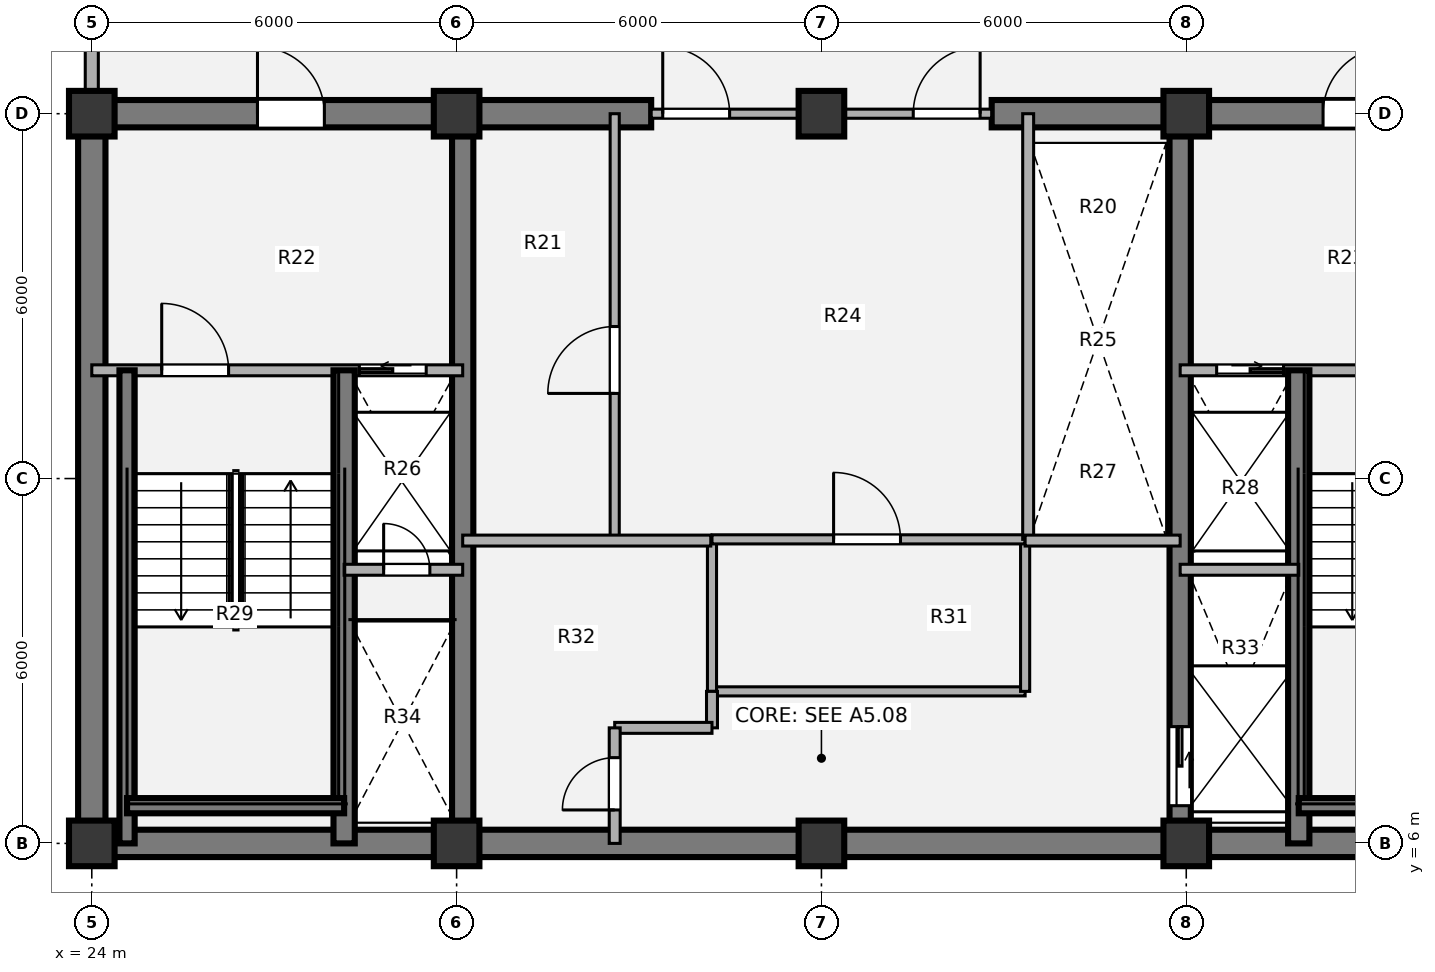
"""IFC4 building model, lengths in metres.
Left out: names, types, materials, properties, quantities, classifications, styles, units other than length and angle.
Written with IfcOpenShell. Run it as: python <this file> out.ifc"""

import sys

from ifc_helpers import new_model, si_unit, direction, frame, frame_2d, origin, origin_2d, place, context, subcontext, project, spatial, rectangle, extrude, source, transform, mapped, element, fill, save


model = new_model("IFC4")
c1 = context("Model", 3, precision=1e-05, world=origin(), true_north=direction((0.0, 1.0)))
c2 = subcontext(c1, "Body", "Model", "MODEL_VIEW")
j1 = project(units=[si_unit("LENGTHUNIT", "METRE"), si_unit("PLANEANGLEUNIT", "RADIAN")], contexts=[c1])
p1 = place(None, origin())
s1 = spatial("IfcSite", under=j1, at=p1, CompositionType="ELEMENT")
p2 = place(p1, origin())
s2 = spatial("IfcBuilding", under=s1, at=p2, CompositionType="ELEMENT")
p3 = place(p2, frame((0.0, 0.0, 175.32)))
s3 = spatial("IfcBuildingStorey", under=s2, at=p3, CompositionType="ELEMENT", Elevation=175.32)
m1 = source(origin(), c2, "Body", "SweptSolid", [
    extrude(rectangle(XDim=0.75, YDim=0.75, at=origin_2d()), origin(), (0.0, 0.0, 1.0), 3.78),
])
for number, where, z_axis, x_axis in (
    (1, (24.0, 6.0, 0.0), (0.0, 0.0, 1.0), (1.0, 0.0, 0.0)),
    (2, (30.0, 6.0, 0.0), (0.0, 0.0, 1.0), (1.0, 0.0, 0.0)),
    (3, (36.0, 6.0, 0.0), (0.0, 0.0, 1.0), (1.0, 0.0, 0.0)),
    (4, (42.0, 6.0, 0.0), (0.0, 0.0, 1.0), (1.0, 0.0, 0.0)),
    (5, (24.0, 18.0, 0.0), (0.0, 0.0, 1.0), (1.0, 0.0, 0.0)),
    (6, (30.0, 18.0, 0.0), (0.0, 0.0, 1.0), (1.0, 0.0, 0.0)),
    (7, (36.0, 18.0, 0.0), (0.0, 0.0, 1.0), (1.0, 0.0, 0.0)),
    (8, (42.0, 18.0, 0.0), (0.0, 0.0, 1.0), (1.0, 0.0, 0.0)),
):
    element("IfcColumn", number, at=place(p3, frame(where, z_axis=z_axis, x_axis=x_axis)), inside=s3, PredefinedType="COLUMN", context=c2, shape_type="MappedRepresentation", body=[
        mapped(m1, transform((0.0, 0.0, 0.0), x_axis=(1.0, 0.0, 0.0), y_axis=(0.0, 1.0, 0.0), z_axis=(0.0, 0.0, 1.0), scale=1.0)),
    ])
p4 = place(p3, frame((48.225, 6.0, 0.0), z_axis=(0.0, 0.0, 1.0), x_axis=(-1.0, 0.0, 0.0)))
e9 = element("IfcWall", 9, at=p4, inside=s3, PredefinedType="SHEAR", context=c2, shape_type="SweptSolid", body=[
    extrude(rectangle(XDim=24.45, YDim=0.45, at=frame_2d((12.225, 0.0))), origin(), (0.0, 0.0, 1.0), 3.78),
])
p5 = place(p3, frame((24.0, 6.0, 0.0), z_axis=(0.0, 0.0, 1.0), x_axis=(0.0, 1.0, 0.0)))
e10 = element("IfcWall", 10, at=p5, inside=s3, PredefinedType="SHEAR", context=c2, shape_type="SweptSolid", body=[
    extrude(rectangle(XDim=12.0, YDim=0.45, at=frame_2d((6.0, 0.0))), origin(), (0.0, 0.0, 1.0), 3.78),
])
p6 = place(p3, frame((23.775, 18.0, 0.0), z_axis=(0.0, 0.0, 1.0), x_axis=(1.0, 0.0, 0.0)))
e11 = element("IfcWall", 11, at=p6, inside=s3, PredefinedType="SHEAR", context=c2, shape_type="SweptSolid", body=[
    extrude(rectangle(XDim=9.425, YDim=0.45, at=frame_2d((4.712, 0.0))), origin(), (0.0, 0.0, 1.0), 3.78),
])
p7 = place(p6, frame((2.95, 0.0, 0.0)))
e12 = element("IfcOpeningElement", 12, at=p7, cuts=e11, PredefinedType="OPENING", context=c2, shape_type="SweptSolid", body=[
    extrude(rectangle(XDim=1.1, YDim=2.1, at=origin_2d()), frame((0.55, 0.235, 1.05), z_axis=(0.0, -1.0, 0.0), x_axis=(1.0, 0.0, 0.0)), (0.0, 0.0, 1.0), 0.47),
])
p8 = place(p3, frame((38.8, 18.0, 0.0), z_axis=(0.0, 0.0, 1.0), x_axis=(1.0, 0.0, 0.0)))
e13 = element("IfcWall", 13, at=p8, inside=s3, PredefinedType="SHEAR", context=c2, shape_type="SweptSolid", body=[
    extrude(rectangle(XDim=9.425, YDim=0.45, at=frame_2d((4.712, 0.0))), origin(), (0.0, 0.0, 1.0), 3.78),
])
p9 = place(p8, frame((5.45, 0.0, 0.0)))
e14 = element("IfcOpeningElement", 14, at=p9, cuts=e13, PredefinedType="OPENING", context=c2, shape_type="SweptSolid", body=[
    extrude(rectangle(XDim=1.1, YDim=2.1, at=origin_2d()), frame((0.55, 0.235, 1.05), z_axis=(0.0, -1.0, 0.0), x_axis=(1.0, 0.0, 0.0)), (0.0, 0.0, 1.0), 0.47),
])
p10 = place(p3, frame((30.1, 6.0, 0.0), z_axis=(0.0, 0.0, 1.0), x_axis=(0.0, 1.0, 0.0)))
e15 = element("IfcWall", 15, at=p10, inside=s3, PredefinedType="SHEAR", context=c2, shape_type="SweptSolid", body=[
    extrude(rectangle(XDim=12.0, YDim=0.35, at=frame_2d((6.0, 0.0))), origin(), (0.0, 0.0, 1.0), 3.78),
])
p11 = place(p3, frame((41.9, 18.0, 0.0), z_axis=(0.0, 0.0, 1.0), x_axis=(0.0, -1.0, 0.0)))
e16 = element("IfcWall", 16, at=p11, inside=s3, PredefinedType="SHEAR", context=c2, shape_type="SweptSolid", body=[
    extrude(rectangle(XDim=12.0, YDim=0.35, at=frame_2d((6.0, 0.0))), origin(), (0.0, 0.0, 1.0), 3.78),
])
p12 = place(p11, frame((10.08, 0.0, 0.0)))
e17 = element("IfcOpeningElement", 17, at=p12, cuts=e16, PredefinedType="OPENING", context=c2, shape_type="SweptSolid", body=[
    extrude(rectangle(XDim=1.3, YDim=2.1, at=origin_2d()), frame((0.65, 0.185, 1.05), z_axis=(0.0, -1.0, 0.0), x_axis=(1.0, 0.0, 0.0)), (0.0, 0.0, 1.0), 0.37),
])
p13 = place(p3, frame((24.0, 18.355, 0.0), z_axis=(0.0, 0.0, 1.0), x_axis=(0.0, 1.0, 0.0)))
e18 = element("IfcWall", 18, at=p13, inside=s3, PredefinedType="SOLIDWALL", context=c2, shape_type="SweptSolid", body=[
    extrude(rectangle(XDim=2.695, YDim=0.215, at=frame_2d((1.348, 0.0))), origin(), (0.0, 0.0, 1.0), 2.718),
])
p14 = place(p3, frame((32.6, 11.0, 0.0), z_axis=(0.0, 0.0, 1.0), x_axis=(0.0, 1.0, 0.0)))
e19 = element("IfcWall", 19, at=p14, inside=s3, PredefinedType="PARTITIONING", context=c2, shape_type="SweptSolid", body=[
    extrude(rectangle(XDim=7.0, YDim=0.15, at=frame_2d((3.5, 0.0))), origin(), (0.0, 0.0, 1.0), 3.5),
])
p15 = place(p14, frame((2.4, 0.0, 0.0)))
e20 = element("IfcOpeningElement", 20, at=p15, cuts=e19, PredefinedType="OPENING", context=c2, shape_type="SweptSolid", body=[
    extrude(rectangle(XDim=1.1, YDim=2.1, at=origin_2d()), frame((0.55, 0.085, 1.05), z_axis=(0.0, -1.0, 0.0), x_axis=(1.0, 0.0, 0.0)), (0.0, 0.0, 1.0), 0.17),
])
p16 = place(p3, frame((34.2, 8.5, 0.0), z_axis=(0.0, 0.0, 1.0), x_axis=(1.0, 0.0, 0.0)))
e21 = element("IfcWall", 21, at=p16, inside=s3, PredefinedType="PARTITIONING", context=c2, shape_type="SweptSolid", body=[
    extrude(rectangle(XDim=5.15, YDim=0.15, at=frame_2d((2.575, 0.0))), origin(), (0.0, 0.0, 1.0), 3.5),
])
for number, where, z_axis, x_axis in (
    (22, (34.2, 8.5, 0.0), (0.0, 0.0, 1.0), (0.0, 1.0, 0.0)),
    (23, (39.35, 8.5, 0.0), (0.0, 0.0, 1.0), (0.0, 1.0, 0.0)),
):
    element("IfcWall", number, at=place(p3, frame(where, z_axis=z_axis, x_axis=x_axis)), inside=s3, PredefinedType="PARTITIONING", context=c2, shape_type="SweptSolid", body=[
        extrude(rectangle(XDim=2.5, YDim=0.15, at=frame_2d((1.25, 0.0))), origin(), (0.0, 0.0, 1.0), 3.5),
    ])
p17 = place(p3, frame((34.2, 11.0, 0.0), z_axis=(0.0, 0.0, 1.0), x_axis=(1.0, 0.0, 0.0)))
e24 = element("IfcWall", 24, at=p17, inside=s3, PredefinedType="PARTITIONING", context=c2, shape_type="SweptSolid", body=[
    extrude(rectangle(XDim=5.15, YDim=0.15, at=frame_2d((2.575, 0.0))), origin(), (0.0, 0.0, 1.0), 3.5),
])
p18 = place(p17, frame((2.0, 0.0, 0.0)))
e25 = element("IfcOpeningElement", 25, at=p18, cuts=e24, PredefinedType="OPENING", context=c2, shape_type="SweptSolid", body=[
    extrude(rectangle(XDim=1.1, YDim=2.1, at=origin_2d()), frame((0.55, 0.085, 1.05), z_axis=(0.0, -1.0, 0.0), x_axis=(1.0, 0.0, 0.0)), (0.0, 0.0, 1.0), 0.17),
])
p19 = place(p3, frame((39.4, 11.0, 0.0), z_axis=(0.0, 0.0, 1.0), x_axis=(0.0, 1.0, 0.0)))
e26 = element("IfcWall", 26, at=p19, inside=s3, PredefinedType="PARTITIONING", context=c2, shape_type="SweptSolid", body=[
    extrude(rectangle(XDim=7.0, YDim=0.18, at=frame_2d((3.5, 0.0))), origin(), (0.0, 0.0, 1.0), 3.5),
])
p20 = place(p3, frame((30.1, 10.98, 0.0), z_axis=(0.0, 0.0, 1.0), x_axis=(1.0, 0.0, 0.0)))
e27 = element("IfcWall", 27, at=p20, inside=s3, PredefinedType="PARTITIONING", context=c2, shape_type="SweptSolid", body=[
    extrude(rectangle(XDim=4.08, YDim=0.18, at=frame_2d((2.04, 0.0))), origin(), (0.0, 0.0, 1.0), 3.5),
])
p21 = place(p3, frame((34.2, 7.9, 0.0), z_axis=(0.0, 0.0, 1.0), x_axis=(0.0, 1.0, 0.0)))
e28 = element("IfcWall", 28, at=p21, inside=s3, PredefinedType="PARTITIONING", context=c2, shape_type="SweptSolid", body=[
    extrude(rectangle(XDim=0.6, YDim=0.18, at=frame_2d((0.3, 0.0))), origin(), (0.0, 0.0, 1.0), 3.5),
])
p22 = place(p3, frame((32.6, 7.9, 0.0), z_axis=(0.0, 0.0, 1.0), x_axis=(1.0, 0.0, 0.0)))
e29 = element("IfcWall", 29, at=p22, inside=s3, PredefinedType="PARTITIONING", context=c2, shape_type="SweptSolid", body=[
    extrude(rectangle(XDim=1.6, YDim=0.18, at=frame_2d((0.8, 0.0))), origin(), (0.0, 0.0, 1.0), 3.5),
])
p23 = place(p3, frame((32.6, 6.0, 0.0), z_axis=(0.0, 0.0, 1.0), x_axis=(0.0, 1.0, 0.0)))
e30 = element("IfcWall", 30, at=p23, inside=s3, PredefinedType="PARTITIONING", context=c2, shape_type="SweptSolid", body=[
    extrude(rectangle(XDim=1.9, YDim=0.18, at=frame_2d((0.95, 0.0))), origin(), (0.0, 0.0, 1.0), 3.5),
])
p24 = place(p23, frame((0.55, 0.0, 0.0)))
e31 = element("IfcOpeningElement", 31, at=p24, cuts=e30, PredefinedType="OPENING", context=c2, shape_type="SweptSolid", body=[
    extrude(rectangle(XDim=0.86, YDim=2.1, at=origin_2d()), frame((0.43, 0.1, 1.05), z_axis=(0.0, -1.0, 0.0), x_axis=(1.0, 0.0, 0.0)), (0.0, 0.0, 1.0), 0.2),
])
p25 = place(p3, frame((39.35, 10.98, 0.0), z_axis=(0.0, 0.0, 1.0), x_axis=(1.0, 0.0, 0.0)))
e32 = element("IfcWall", 32, at=p25, inside=s3, PredefinedType="PARTITIONING", context=c2, shape_type="SweptSolid", body=[
    extrude(rectangle(XDim=2.55, YDim=0.18, at=frame_2d((1.275, 0.0))), origin(), (0.0, 0.0, 1.0), 3.5),
])
p26 = place(p3, frame((33.2, 18.0, 0.0), z_axis=(0.0, 0.0, 1.0), x_axis=(1.0, 0.0, 0.0)))
e33 = element("IfcWall", 33, at=p26, inside=s3, PredefinedType="PARTITIONING", context=c2, shape_type="SweptSolid", body=[
    extrude(rectangle(XDim=5.6, YDim=0.15, at=frame_2d((2.8, 0.0))), origin(), (0.0, 0.0, 1.0), 2.515),
])
p27 = place(p26, frame((0.19, 0.0, 0.0)))
e34 = element("IfcOpeningElement", 34, at=p27, cuts=e33, PredefinedType="OPENING", context=c2, shape_type="SweptSolid", body=[
    extrude(rectangle(XDim=1.1, YDim=2.1, at=origin_2d()), frame((0.55, 0.085, 1.05), z_axis=(0.0, -1.0, 0.0), x_axis=(1.0, 0.0, 0.0)), (0.0, 0.0, 1.0), 0.17),
])
p28 = place(p26, frame((4.31, 0.0, 0.0)))
e35 = element("IfcOpeningElement", 35, at=p28, cuts=e33, PredefinedType="OPENING", context=c2, shape_type="SweptSolid", body=[
    extrude(rectangle(XDim=1.1, YDim=2.1, at=origin_2d()), frame((0.55, 0.085, 1.05), z_axis=(0.0, -1.0, 0.0), x_axis=(1.0, 0.0, 0.0)), (0.0, 0.0, 1.0), 0.17),
])
p29 = place(p3, frame((24.0, 13.78, 0.0), z_axis=(0.0, 0.0, 1.0), x_axis=(1.0, 0.0, 0.0)))
e36 = element("IfcWall", 36, at=p29, inside=s3, PredefinedType="PARTITIONING", context=c2, shape_type="SweptSolid", body=[
    extrude(rectangle(XDim=6.1, YDim=0.18, at=frame_2d((3.05, 0.0))), origin(), (0.0, 0.0, 1.0), 3.5),
])
p30 = place(p29, frame((1.15, 0.0, 0.0)))
e37 = element("IfcOpeningElement", 37, at=p30, cuts=e36, PredefinedType="OPENING", context=c2, shape_type="SweptSolid", body=[
    extrude(rectangle(XDim=1.1, YDim=2.1, at=origin_2d()), frame((0.55, 0.1, 1.05), z_axis=(0.0, -1.0, 0.0), x_axis=(1.0, 0.0, 0.0)), (0.0, 0.0, 1.0), 0.2),
])
p31 = place(p29, frame((4.4, 0.0, 0.0)))
e38 = element("IfcOpeningElement", 38, at=p31, cuts=e36, PredefinedType="OPENING", context=c2, shape_type="SweptSolid", body=[
    extrude(rectangle(XDim=1.1, YDim=2.1, at=origin_2d()), frame((0.55, 0.1, 1.05), z_axis=(0.0, -1.0, 0.0), x_axis=(1.0, 0.0, 0.0)), (0.0, 0.0, 1.0), 0.2),
])
p32 = place(p3, frame((28.15, 6.0, 0.0), z_axis=(0.0, 0.0, 1.0), x_axis=(0.0, 1.0, 0.0)))
e39 = element("IfcWall", 39, at=p32, inside=s3, PredefinedType="SHEAR", context=c2, shape_type="SweptSolid", body=[
    extrude(rectangle(XDim=7.78, YDim=0.35, at=frame_2d((3.89, 0.0))), origin(), (0.0, 0.0, 1.0), 3.85),
])
p33 = place(p3, frame((24.58, 6.0, 0.0), z_axis=(0.0, 0.0, 1.0), x_axis=(0.0, 1.0, 0.0)))
e40 = element("IfcWall", 40, at=p33, inside=s3, PredefinedType="SHEAR", context=c2, shape_type="SweptSolid", body=[
    extrude(rectangle(XDim=7.78, YDim=0.25, at=frame_2d((3.89, 0.0))), origin(), (0.0, 0.0, 1.0), 3.85),
])
p34 = place(p3, frame((24.58, 6.62, 0.0), z_axis=(0.0, 0.0, 1.0), x_axis=(1.0, 0.0, 0.0)))
e41 = element("IfcWall", 41, at=p34, inside=s3, PredefinedType="SHEAR", context=c2, shape_type="SweptSolid", body=[
    extrude(rectangle(XDim=3.57, YDim=0.25, at=frame_2d((1.785, 0.0))), origin(), (0.0, 0.0, 1.0), 3.85),
])
p35 = place(p3, frame((28.15, 10.5, 0.0), z_axis=(0.0, 0.0, 1.0), x_axis=(1.0, 0.0, 0.0)))
e42 = element("IfcWall", 42, at=p35, inside=s3, PredefinedType="PARTITIONING", context=c2, shape_type="SweptSolid", body=[
    extrude(rectangle(XDim=1.95, YDim=0.18, at=frame_2d((0.975, 0.0))), origin(), (0.0, 0.0, 1.0), 3.5),
])
p36 = place(p35, frame((0.65, 0.0, 0.0)))
e43 = element("IfcOpeningElement", 43, at=p36, cuts=e42, PredefinedType="OPENING", context=c2, shape_type="SweptSolid", body=[
    extrude(rectangle(XDim=0.76, YDim=2.05, at=origin_2d()), frame((0.38, 0.1, 1.025), z_axis=(0.0, -1.0, 0.0), x_axis=(1.0, 0.0, 0.0)), (0.0, 0.0, 1.0), 0.2),
])
p37 = place(p3, frame((41.9, 13.78, 0.0), z_axis=(0.0, 0.0, 1.0), x_axis=(1.0, 0.0, 0.0)))
e44 = element("IfcWall", 44, at=p37, inside=s3, PredefinedType="PARTITIONING", context=c2, shape_type="SweptSolid", body=[
    extrude(rectangle(XDim=6.1, YDim=0.18, at=frame_2d((3.05, 0.0))), origin(), (0.0, 0.0, 1.0), 3.5),
])
p38 = place(p37, frame((0.6, 0.0, 0.0)))
e45 = element("IfcOpeningElement", 45, at=p38, cuts=e44, PredefinedType="OPENING", context=c2, shape_type="SweptSolid", body=[
    extrude(rectangle(XDim=1.1, YDim=2.1, at=origin_2d()), frame((0.55, 0.1, 1.05), z_axis=(0.0, -1.0, 0.0), x_axis=(1.0, 0.0, 0.0)), (0.0, 0.0, 1.0), 0.2),
])
p39 = place(p37, frame((3.8, 0.0, 0.0)))
e46 = element("IfcOpeningElement", 46, at=p39, cuts=e44, PredefinedType="OPENING", context=c2, shape_type="SweptSolid", body=[
    extrude(rectangle(XDim=1.1, YDim=2.1, at=origin_2d()), frame((0.55, 0.1, 1.05), z_axis=(0.0, -1.0, 0.0), x_axis=(1.0, 0.0, 0.0)), (0.0, 0.0, 1.0), 0.2),
])
p40 = place(p3, frame((43.85, 6.0, 0.0), z_axis=(0.0, 0.0, 1.0), x_axis=(0.0, 1.0, 0.0)))
e47 = element("IfcWall", 47, at=p40, inside=s3, PredefinedType="SHEAR", context=c2, shape_type="SweptSolid", body=[
    extrude(rectangle(XDim=7.78, YDim=0.35, at=frame_2d((3.89, 0.0))), origin(), (0.0, 0.0, 1.0), 3.85),
])
p41 = place(p3, frame((43.85, 6.62, 0.0), z_axis=(0.0, 0.0, 1.0), x_axis=(1.0, 0.0, 0.0)))
e48 = element("IfcWall", 48, at=p41, inside=s3, PredefinedType="SHEAR", context=c2, shape_type="SweptSolid", body=[
    extrude(rectangle(XDim=3.57, YDim=0.25, at=frame_2d((1.785, 0.0))), origin(), (0.0, 0.0, 1.0), 3.85),
])
p42 = place(p3, frame((41.9, 10.5, 0.0), z_axis=(0.0, 0.0, 1.0), x_axis=(1.0, 0.0, 0.0)))
e49 = element("IfcWall", 49, at=p42, inside=s3, PredefinedType="PARTITIONING", context=c2, shape_type="SweptSolid", body=[
    extrude(rectangle(XDim=1.95, YDim=0.18, at=frame_2d((0.975, 0.0))), origin(), (0.0, 0.0, 1.0), 3.5),
])
m2 = source(origin(), c2, "Body", "SweptSolid", [
    extrude(rectangle(XDim=1.1, YDim=2.1, at=origin_2d()), frame((0.55, 0.025, 1.05), z_axis=(0.0, -1.0, 0.0), x_axis=(1.0, 0.0, 0.0)), (0.0, 0.0, 1.0), 0.05),
])
p43 = place(p15, origin())
e50 = element("IfcDoor", 50, at=p43, inside=s3, OperationType="SINGLE_SWING_LEFT", PredefinedType="DOOR", context=c2, shape_type="MappedRepresentation", body=[
    mapped(m2, transform((0.0, 0.0, 0.0), x_axis=(1.0, 0.0, 0.0), y_axis=(0.0, 1.0, 0.0), z_axis=(0.0, 0.0, 1.0), scale=1.0)),
])
fill(e20, e50)
p44 = place(p18, origin())
e51 = element("IfcDoor", 51, at=p44, inside=s3, OperationType="SINGLE_SWING_LEFT", PredefinedType="DOOR", context=c2, shape_type="MappedRepresentation", body=[
    mapped(m2, transform((0.0, 0.0, 0.0), x_axis=(1.0, 0.0, 0.0), y_axis=(0.0, 1.0, 0.0), z_axis=(0.0, 0.0, 1.0), scale=1.0)),
])
fill(e25, e51)
m3 = source(origin(), c2, "Body", "SweptSolid", [
    extrude(rectangle(XDim=0.86, YDim=2.1, at=origin_2d()), frame((0.43, 0.025, 1.05), z_axis=(0.0, -1.0, 0.0), x_axis=(1.0, 0.0, 0.0)), (0.0, 0.0, 1.0), 0.05),
])
p45 = place(p24, origin())
e52 = element("IfcDoor", 52, at=p45, inside=s3, OperationType="SINGLE_SWING_LEFT", PredefinedType="DOOR", context=c2, shape_type="MappedRepresentation", body=[
    mapped(m3, transform((0.0, 0.0, 0.0), x_axis=(1.0, 0.0, 0.0), y_axis=(0.0, 1.0, 0.0), z_axis=(0.0, 0.0, 1.0), scale=1.0)),
])
fill(e31, e52)
m4 = source(origin(), c2, "Body", "SweptSolid", [
    extrude(rectangle(XDim=1.1, YDim=2.1, at=origin_2d()), frame((0.55, 0.025, 1.05), z_axis=(0.0, -1.0, 0.0), x_axis=(1.0, 0.0, 0.0)), (0.0, 0.0, 1.0), 0.05),
])
p46 = place(p27, origin())
e53 = element("IfcDoor", 53, at=p46, inside=s3, OperationType="SINGLE_SWING_LEFT", PredefinedType="DOOR", context=c2, shape_type="MappedRepresentation", body=[
    mapped(m4, transform((0.0, 0.0, 0.0), x_axis=(1.0, 0.0, 0.0), y_axis=(0.0, 1.0, 0.0), z_axis=(0.0, 0.0, 1.0), scale=1.0)),
])
fill(e34, e53)
p47 = place(p28, origin())
e54 = element("IfcDoor", 54, at=p47, inside=s3, OperationType="SINGLE_SWING_RIGHT", PredefinedType="DOOR", context=c2, shape_type="MappedRepresentation", body=[
    mapped(m4, transform((0.0, 0.0, 0.0), x_axis=(1.0, 0.0, 0.0), y_axis=(0.0, 1.0, 0.0), z_axis=(0.0, 0.0, 1.0), scale=1.0)),
])
fill(e35, e54)
m5 = source(origin(), c2, "Body", "SweptSolid", [
    extrude(rectangle(XDim=1.1, YDim=2.1, at=origin_2d()), frame((0.55, 0.025, 1.05), z_axis=(0.0, -1.0, 0.0), x_axis=(1.0, 0.0, 0.0)), (0.0, 0.0, 1.0), 0.05),
])
p48 = place(p30, origin())
e55 = element("IfcDoor", 55, at=p48, inside=s3, OperationType="SINGLE_SWING_LEFT", PredefinedType="DOOR", context=c2, shape_type="MappedRepresentation", body=[
    mapped(m5, transform((0.0, 0.0, 0.0), x_axis=(1.0, 0.0, 0.0), y_axis=(0.0, 1.0, 0.0), z_axis=(0.0, 0.0, 1.0), scale=1.0)),
])
fill(e37, e55)
m6 = source(origin(), c2, "Body", "SweptSolid", [
    extrude(rectangle(XDim=1.1, YDim=2.1, at=origin_2d()), frame((0.55, 0.025, 1.05), z_axis=(0.0, -1.0, 0.0), x_axis=(1.0, 0.0, 0.0)), (0.0, 0.0, 1.0), 0.05),
])
p49 = place(p31, origin())
e56 = element("IfcDoor", 56, at=p49, inside=s3, OperationType="SLIDING_TO_LEFT", PredefinedType="DOOR", context=c2, shape_type="MappedRepresentation", body=[
    mapped(m6, transform((0.0, 0.0, 0.0), x_axis=(1.0, 0.0, 0.0), y_axis=(0.0, 1.0, 0.0), z_axis=(0.0, 0.0, 1.0), scale=1.0)),
])
fill(e38, e56)
m7 = source(origin(), c2, "Body", "SweptSolid", [
    extrude(rectangle(XDim=0.76, YDim=2.05, at=origin_2d()), frame((0.38, 0.025, 1.025), z_axis=(0.0, -1.0, 0.0), x_axis=(1.0, 0.0, 0.0)), (0.0, 0.0, 1.0), 0.05),
])
p50 = place(p36, origin())
e57 = element("IfcDoor", 57, at=p50, inside=s3, OperationType="SINGLE_SWING_LEFT", PredefinedType="DOOR", context=c2, shape_type="MappedRepresentation", body=[
    mapped(m7, transform((0.0, 0.0, 0.0), x_axis=(1.0, 0.0, 0.0), y_axis=(0.0, 1.0, 0.0), z_axis=(0.0, 0.0, 1.0), scale=1.0)),
])
fill(e43, e57)
p51 = place(p38, origin())
e58 = element("IfcDoor", 58, at=p51, inside=s3, OperationType="SLIDING_TO_RIGHT", PredefinedType="DOOR", context=c2, shape_type="MappedRepresentation", body=[
    mapped(m6, transform((0.0, 0.0, 0.0), x_axis=(1.0, 0.0, 0.0), y_axis=(0.0, 1.0, 0.0), z_axis=(0.0, 0.0, 1.0), scale=1.0)),
])
fill(e45, e58)
m8 = source(origin(), c2, "Body", "SweptSolid", [
    extrude(rectangle(XDim=1.3, YDim=2.1, at=origin_2d()), frame((0.65, 0.025, 1.05), z_axis=(0.0, -1.0, 0.0), x_axis=(1.0, 0.0, 0.0)), (0.0, 0.0, 1.0), 0.05),
])
p52 = place(p12, origin())
e59 = element("IfcDoor", 59, at=p52, inside=s3, OperationType="SLIDING_TO_LEFT", PredefinedType="DOOR", context=c2, shape_type="MappedRepresentation", body=[
    mapped(m8, transform((0.0, 0.0, 0.0), x_axis=(1.0, 0.0, 0.0), y_axis=(0.0, 1.0, 0.0), z_axis=(0.0, 0.0, 1.0), scale=1.0)),
])
fill(e17, e59)
p53 = place(p7, origin())
e60 = element("IfcDoor", 60, at=p53, inside=s3, OperationType="SINGLE_SWING_LEFT", PredefinedType="DOOR", context=c2, shape_type="MappedRepresentation", body=[
    mapped(m4, transform((0.0, 0.0, 0.0), x_axis=(1.0, 0.0, 0.0), y_axis=(0.0, 1.0, 0.0), z_axis=(0.0, 0.0, 1.0), scale=1.0)),
])
fill(e12, e60)
p54 = place(p9, origin())
e61 = element("IfcDoor", 61, at=p54, inside=s3, OperationType="SINGLE_SWING_RIGHT", PredefinedType="DOOR", context=c2, shape_type="MappedRepresentation", body=[
    mapped(m4, transform((0.0, 0.0, 0.0), x_axis=(1.0, 0.0, 0.0), y_axis=(0.0, 1.0, 0.0), z_axis=(0.0, 0.0, 1.0), scale=1.0)),
])
fill(e14, e61)
save(model, sys.argv[1])
